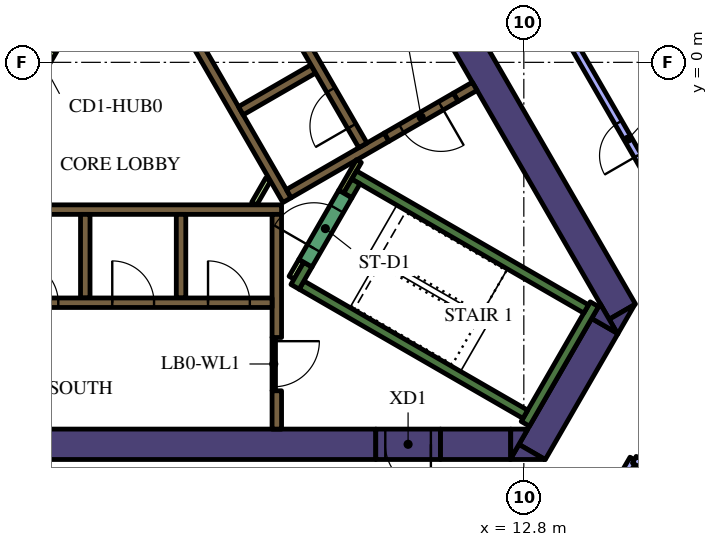
"""IFC4 building model, lengths in metres.
Left out: names, types, materials, properties, quantities, classifications, styles, units other than length and angle.
Written with IfcOpenShell. Run it as: python <this file> out.ifc"""

import sys

from ifc_helpers import new_model, si_unit, direction, frame, frame_2d, origin, place, context, subcontext, project, spatial, polyline, rectangle, outline, extrude, element, fill, save


model = new_model("IFC4")
c1 = context("Model", 3, precision=1e-05, world=origin(), true_north=direction((0.0, 1.0)))
c2 = subcontext(c1, "Body", "Model", "MODEL_VIEW")
j1 = project(units=[si_unit("LENGTHUNIT", "METRE"), si_unit("PLANEANGLEUNIT", "RADIAN")], contexts=[c1])
p1 = place(None, origin())
s1 = spatial("IfcSite", under=j1, at=p1, CompositionType="ELEMENT")
p2 = place(p1, origin())
s2 = spatial("IfcBuilding", under=s1, at=p2, CompositionType="ELEMENT")
p3 = place(p2, frame((0.0, 0.0, 162.6)))
s3 = spatial("IfcBuildingStorey", under=s2, at=p3, CompositionType="ELEMENT", Elevation=162.6)
p4 = place(p3, frame((9.129, 4.289, 0.0), z_axis=(0.0, 0.0, 1.0), x_axis=(0.499995742806, -0.866027861663, 0.0)))
e1 = element("IfcWall", 1, at=p4, inside=s3, PredefinedType="SOLIDWALL", context=c2, shape_type="SweptSolid", body=[
    extrude(rectangle(XDim=12.527, YDim=0.8, at=frame_2d((6.264, 0.0))), origin(), (0.0, 0.0, 1.0), 4.2),
])
p5 = place(p3, origin())
e2 = element("IfcWall", 2, at=p5, inside=s3, PredefinedType="SOLIDWALL", context=c2, shape_type="SweptSolid", body=[
    extrude(outline(polyline([(15.271, -7.15), (15.047, -6.762), (15.719, -6.374), (15.271, -7.15)])), origin(), (0.0, 0.0, 1.0), 4.2),
])
p6 = place(p3, frame((13.018, -10.252, 0.0), z_axis=(0.0, 0.0, 1.0), x_axis=(0.499984020225, 0.866034629516, 0.0)))
e3 = element("IfcWall", 3, at=p6, inside=s3, PredefinedType="SOLIDWALL", context=c2, shape_type="SweptSolid", body=[
    extrude(rectangle(XDim=3.824, YDim=0.8, at=frame_2d((1.912, 0.0))), origin(), (0.0, 0.0, 1.0), 4.2),
])
e4 = element("IfcWall", 4, at=p5, inside=s3, PredefinedType="SOLIDWALL", context=c2, shape_type="SweptSolid", body=[
    extrude(outline(polyline([(12.442, -10.45), (12.671, -10.053), (13.358, -10.45), (12.442, -10.45)])), origin(), (0.0, 0.0, 1.0), 4.2),
])
e5 = element("IfcWall", 5, at=p5, inside=s3, PredefinedType="SOLIDWALL", context=c2, shape_type="SweptSolid", body=[
    extrude(outline(polyline([(14.809, -6.35), (15.257, -7.126), (14.585, -6.738), (14.809, -6.35)])), origin(), (0.0, 0.0, 1.0), 4.2),
])
p7 = place(p3, frame((10.604, -10.05, 0.0), z_axis=(0.0, 0.0, 1.0), x_axis=(1.0, 0.0, 0.0)))
e6 = element("IfcWall", 6, at=p7, inside=s3, PredefinedType="SOLIDWALL", context=c2, shape_type="SweptSolid", body=[
    extrude(rectangle(XDim=1.849, YDim=0.8, at=frame_2d((0.925, 0.0))), origin(), (0.0, 0.0, 1.0), 4.2),
])
e7 = element("IfcWall", 7, at=p5, inside=s3, PredefinedType="SOLIDWALL", context=c2, shape_type="SweptSolid", body=[
    extrude(outline(polyline([(12.904, -9.65), (12.456, -10.426), (12.456, -9.65), (12.904, -9.65)])), origin(), (0.0, 0.0, 1.0), 4.2),
])
p8 = place(p3, frame((-13.378, -10.05, 0.0), z_axis=(0.0, 0.0, 1.0), x_axis=(1.0, 0.0, 0.0)))
e8 = element("IfcWall", 8, at=p8, inside=s3, PredefinedType="SOLIDWALL", context=c2, shape_type="SweptSolid", body=[
    extrude(rectangle(XDim=22.282, YDim=0.8, at=frame_2d((11.141, 0.0))), origin(), (0.0, 0.0, 1.0), 4.2),
])
p9 = place(p3, frame((12.84, -9.511, 0.0), z_axis=(0.0, 0.0, 1.0), x_axis=(0.499997733992, 0.866026712061, 0.0)))
e9 = element("IfcWall", 9, at=p9, inside=s3, PredefinedType="SOLIDWALL", context=c2, shape_type="SweptSolid", body=[
    extrude(rectangle(XDim=3.634, YDim=0.25, at=frame_2d((1.817, 0.0))), origin(), (0.0, 0.0, 1.0), 4.2),
])
p10 = place(p3, frame((12.84, -9.261, 0.0), z_axis=(0.0, 0.0, 1.0), x_axis=(-0.866013990052, 0.500019768644, 0.0)))
e10 = element("IfcWall", 10, at=p10, inside=s3, PredefinedType="SOLIDWALL", context=c2, shape_type="SweptSolid", body=[
    extrude(rectangle(XDim=6.8, YDim=0.25, at=frame_2d((3.4, 0.0))), origin(), (0.0, 0.0, 1.0), 4.2),
])
p11 = place(p3, frame((6.78, -5.906, 0.0), z_axis=(0.0, 0.0, 1.0), x_axis=(0.500223362819, 0.865896406789, 0.0)))
e11 = element("IfcWall", 11, at=p11, inside=s3, PredefinedType="SOLIDWALL", context=c2, shape_type="SweptSolid", body=[
    extrude(rectangle(XDim=0.675, YDim=0.25, at=frame_2d((0.337, 0.0))), origin(), (0.0, 0.0, 1.0), 4.2),
])
p12 = place(p3, frame((8.334, -2.964, 0.0), z_axis=(0.0, 0.0, 1.0), x_axis=(0.866016039709, -0.500016218704, 0.0)))
e12 = element("IfcWall", 12, at=p12, inside=s3, PredefinedType="SOLIDWALL", context=c2, shape_type="SweptSolid", body=[
    extrude(rectangle(XDim=7.05, YDim=0.25, at=frame_2d((3.525, 0.0))), origin(), (0.0, 0.0, 1.0), 4.2),
])
p13 = place(p3, frame((8.168, -3.503, 0.0), z_axis=(0.0, 0.0, 1.0), x_axis=(0.49972245349, 0.866185586049, 0.0)))
e13 = element("IfcWall", 13, at=p13, inside=s3, PredefinedType="SOLIDWALL", context=c2, shape_type="SweptSolid", body=[
    extrude(rectangle(XDim=0.425, YDim=0.25, at=frame_2d((0.212, 0.0))), origin(), (0.0, 0.0, 1.0), 4.2),
])
p14 = place(p3, frame((-5.545, -3.875, 0.0), z_axis=(0.0, 0.0, 1.0), x_axis=(1.0, 0.0, 0.0)))
e14 = element("IfcWall", 14, at=p14, inside=s3, PredefinedType="SOLIDWALL", context=c2, shape_type="SweptSolid", body=[
    extrude(rectangle(XDim=11.97, YDim=0.25, at=frame_2d((5.985, 0.0))), origin(), (0.0, 0.0, 1.0), 4.2),
])
p15 = place(p3, frame((6.3, -7.24, 0.0), z_axis=(0.0, 0.0, 1.0), x_axis=(0.0, 1.0, 0.0)))
e15 = element("IfcWall", 15, at=p15, inside=s3, PredefinedType="SOLIDWALL", context=c2, shape_type="SweptSolid", body=[
    extrude(rectangle(XDim=3.24, YDim=0.25, at=frame_2d((1.62, 0.0))), origin(), (0.0, 0.0, 1.0), 4.2),
])
p16 = place(p3, frame((6.3, -9.65, 0.0), z_axis=(0.0, 0.0, 1.0), x_axis=(0.0, 1.0, 0.0)))
e16 = element("IfcWall", 16, at=p16, inside=s3, PredefinedType="SOLIDWALL", context=c2, shape_type="SweptSolid", body=[
    extrude(rectangle(XDim=1.008, YDim=0.25, at=frame_2d((0.504, 0.0))), origin(), (0.0, 0.0, 1.0), 4.2),
])
for number, where, z_axis, x_axis in (
    (17, (3.78, -4.0, 0.0), (0.0, 0.0, 1.0), (0.0, -1.0, 0.0)),
    (18, (1.26, -4.0, 0.0), (0.0, 0.0, 1.0), (0.0, -1.0, 0.0)),
):
    element("IfcWall", number, at=place(p3, frame(where, z_axis=z_axis, x_axis=x_axis)), inside=s3, PredefinedType="SOLIDWALL", context=c2, shape_type="SweptSolid", body=[
        extrude(rectangle(XDim=2.2, YDim=0.25, at=frame_2d((1.1, 0.0))), origin(), (0.0, 0.0, 1.0), 4.2),
    ])
p17 = place(p3, frame((11.507, -0.631, 0.0), z_axis=(0.0, 0.0, 1.0), x_axis=(-0.866093731455, -0.499881634324, 0.0)))
e19 = element("IfcWall", 19, at=p17, inside=s3, PredefinedType="SOLIDWALL", context=c2, shape_type="SweptSolid", body=[
    extrude(rectangle(XDim=0.575, YDim=0.25, at=frame_2d((0.288, 0.0))), origin(), (0.0, 0.0, 1.0), 4.2),
])
p18 = place(p3, frame((6.568, -3.627, 0.0), z_axis=(0.0, 0.0, 1.0), x_axis=(-0.499999455981, 0.866025717874, 0.0)))
e20 = element("IfcWall", 20, at=p18, inside=s3, PredefinedType="SOLIDWALL", context=c2, shape_type="SweptSolid", body=[
    extrude(rectangle(XDim=11.978, YDim=0.25, at=frame_2d((5.989, 0.0))), origin(), (0.0, 0.0, 1.0), 4.2),
])
p19 = place(p3, frame((5.354, -1.274, 0.0), z_axis=(0.0, 0.0, 1.0), x_axis=(0.866008176907, 0.50002983664, 0.0)))
e21 = element("IfcWall", 21, at=p19, inside=s3, PredefinedType="SOLIDWALL", context=c2, shape_type="SweptSolid", body=[
    extrude(rectangle(XDim=2.2, YDim=0.25, at=frame_2d((1.1, 0.0))), origin(), (0.0, 0.0, 1.0), 4.2),
])
p20 = place(p3, frame((6.614, -3.456, 0.0), z_axis=(0.0, 0.0, 1.0), x_axis=(0.866032512851, 0.499987686533, 0.0)))
e22 = element("IfcWall", 22, at=p20, inside=s3, PredefinedType="SOLIDWALL", context=c2, shape_type="SweptSolid", body=[
    extrude(rectangle(XDim=2.975, YDim=0.25, at=frame_2d((1.487, 0.0))), origin(), (0.0, 0.0, 1.0), 4.2),
])
p21 = place(p3, frame((6.945, -5.222, 0.0), z_axis=(0.0, 0.0, 1.0), x_axis=(-0.499818422106, -0.866130212453, 0.0)))
e23 = element("IfcWall", 23, at=p21, inside=s3, PredefinedType="PARTITIONING", context=c2, shape_type="SweptSolid", body=[
    extrude(rectangle(XDim=0.514, YDim=0.15, at=frame_2d((0.257, 0.0))), origin(), (0.0, 0.0, 1.0), 3.15),
])
p22 = place(p3, frame((8.459, -2.599, 0.0), z_axis=(0.0, 0.0, 1.0), x_axis=(-0.500041054325, -0.866001699761, 0.0)))
e24 = element("IfcWall", 24, at=p22, inside=s3, PredefinedType="PARTITIONING", context=c2, shape_type="SweptSolid", body=[
    extrude(rectangle(XDim=0.929, YDim=0.15, at=frame_2d((0.464, 0.0))), origin(), (0.0, 0.0, 1.0), 4.2),
])
p23 = place(p3, frame((5.705, -3.718, 0.0), z_axis=(0.0, 0.0, 1.0), x_axis=(0.499962090823, 0.866047289552, 0.0)))
e25 = element("IfcWall", 25, at=p23, inside=s3, PredefinedType="PARTITIONING", context=c2, shape_type="SweptSolid", body=[
    extrude(rectangle(XDim=0.735, YDim=0.15, at=frame_2d((0.367, 0.0))), origin(), (0.0, 0.0, 1.0), 3.15),
])
p24 = place(p3, frame((-6.175, -6.325, 0.0), z_axis=(0.0, 0.0, 1.0), x_axis=(1.0, 0.0, 0.0)))
e26 = element("IfcWall", 26, at=p24, inside=s3, PredefinedType="SOLIDWALL", context=c2, shape_type="SweptSolid", body=[
    extrude(rectangle(XDim=12.35, YDim=0.25, at=frame_2d((6.175, 0.0))), origin(), (0.0, 0.0, 1.0), 4.2),
])
p25 = place(p24, frame((0.585, 0.0, 0.0)))
e27 = element("IfcOpeningElement", 27, at=p25, cuts=e26, PredefinedType="OPENING", context=c2, shape_type="SweptSolid", body=[
    extrude(rectangle(XDim=1.1, YDim=2.1, at=frame_2d((0.55, 1.05))), frame((0.0, 0.135, 0.0), z_axis=(0.0, -1.0, 0.0), x_axis=(1.0, 0.0, 0.0)), (0.0, 0.0, 1.0), 0.27),
])
p26 = place(p24, frame((3.105, 0.0, 0.0)))
e28 = element("IfcOpeningElement", 28, at=p26, cuts=e26, PredefinedType="OPENING", context=c2, shape_type="SweptSolid", body=[
    extrude(rectangle(XDim=1.1, YDim=2.1, at=frame_2d((0.55, 1.05))), frame((0.0, 0.135, 0.0), z_axis=(0.0, -1.0, 0.0), x_axis=(1.0, 0.0, 0.0)), (0.0, 0.0, 1.0), 0.27),
])
p27 = place(p24, frame((5.625, 0.0, 0.0)))
e29 = element("IfcOpeningElement", 29, at=p27, cuts=e26, PredefinedType="OPENING", context=c2, shape_type="SweptSolid", body=[
    extrude(rectangle(XDim=1.1, YDim=2.1, at=frame_2d((0.55, 1.05))), frame((0.0, 0.135, 0.0), z_axis=(0.0, -1.0, 0.0), x_axis=(1.0, 0.0, 0.0)), (0.0, 0.0, 1.0), 0.27),
])
p28 = place(p24, frame((8.145, 0.0, 0.0)))
e30 = element("IfcOpeningElement", 30, at=p28, cuts=e26, PredefinedType="OPENING", context=c2, shape_type="SweptSolid", body=[
    extrude(rectangle(XDim=1.1, YDim=2.1, at=frame_2d((0.55, 1.05))), frame((0.0, 0.135, 0.0), z_axis=(0.0, -1.0, 0.0), x_axis=(1.0, 0.0, 0.0)), (0.0, 0.0, 1.0), 0.27),
])
p29 = place(p24, frame((10.665, 0.0, 0.0)))
e31 = element("IfcOpeningElement", 31, at=p29, cuts=e26, PredefinedType="OPENING", context=c2, shape_type="SweptSolid", body=[
    extrude(rectangle(XDim=1.1, YDim=2.1, at=frame_2d((0.55, 1.05))), frame((0.0, 0.135, 0.0), z_axis=(0.0, -1.0, 0.0), x_axis=(1.0, 0.0, 0.0)), (0.0, 0.0, 1.0), 0.27),
])
p30 = place(p3, frame((8.565, -2.185, 0.0), z_axis=(0.0, 0.0, 1.0), x_axis=(-0.499997954832, 0.866026584559, 0.0)))
e32 = element("IfcWall", 32, at=p30, inside=s3, PredefinedType="SOLIDWALL", context=c2, shape_type="SweptSolid", body=[
    extrude(rectangle(XDim=12.35, YDim=0.25, at=frame_2d((6.175, 0.0))), origin(), (0.0, 0.0, 1.0), 4.2),
])
p31 = place(p30, frame((0.585, 0.0, 0.0)))
e33 = element("IfcOpeningElement", 33, at=p31, cuts=e32, PredefinedType="OPENING", context=c2, shape_type="SweptSolid", body=[
    extrude(rectangle(XDim=1.1, YDim=2.1, at=frame_2d((0.55, 1.05))), frame((0.0, 0.135, 0.0), z_axis=(0.0, -1.0, 0.0), x_axis=(1.0, 0.0, 0.0)), (0.0, 0.0, 1.0), 0.27),
])
p32 = place(p3, frame((7.053, -5.284, 0.0), z_axis=(0.0, 0.0, 1.0), x_axis=(0.500078061341, 0.865980330357, 0.0)))
e34 = element("IfcWall", 34, at=p32, inside=s3, PredefinedType="SOLIDWALL", context=c2, shape_type="SweptSolid", body=[
    extrude(rectangle(XDim=2.1, YDim=0.4, at=frame_2d((1.05, 0.0))), origin(), (0.0, 0.0, 1.0), 4.2),
])
p33 = place(p32, frame((0.45, 0.0, 0.0)))
e35 = element("IfcOpeningElement", 35, at=p33, cuts=e34, PredefinedType="OPENING", context=c2, shape_type="SweptSolid", body=[
    extrude(rectangle(XDim=1.2, YDim=2.1, at=frame_2d((0.6, 1.05))), frame((0.0, 0.21, 0.0), z_axis=(0.0, -1.0, 0.0), x_axis=(1.0, 0.0, 0.0)), (0.0, 0.0, 1.0), 0.42),
])
p34 = place(p3, frame((-0.33, -1.022, 0.0), z_axis=(0.0, 0.0, 1.0), x_axis=(0.500027713859, 0.866009402589, 0.0)))
e36 = element("IfcWall", 36, at=p34, inside=s3, PredefinedType="PARTITIONING", context=c2, shape_type="SweptSolid", body=[
    extrude(rectangle(XDim=2.1, YDim=0.15, at=frame_2d((1.05, 0.0))), origin(), (0.0, 0.0, 1.0), 3.15),
])
p35 = place(p34, frame((0.6, 0.0, 0.0)))
e37 = element("IfcOpeningElement", 37, at=p35, cuts=e36, PredefinedType="OPENING", context=c2, shape_type="SweptSolid", body=[
    extrude(rectangle(XDim=0.9, YDim=2.1, at=frame_2d((0.45, 1.05))), frame((0.0, 0.085, 0.0), z_axis=(0.0, -1.0, 0.0), x_axis=(1.0, 0.0, 0.0)), (0.0, 0.0, 1.0), 0.17),
])
p36 = place(p3, frame((6.22, -7.237, 0.0), z_axis=(0.0, 0.0, 1.0), x_axis=(0.0, -1.0, 0.0)))
e38 = element("IfcWall", 38, at=p36, inside=s3, PredefinedType="PARTITIONING", context=c2, shape_type="SweptSolid", body=[
    extrude(rectangle(XDim=1.4, YDim=0.09, at=frame_2d((0.7, 0.0))), origin(), (0.0, 0.0, 1.0), 3.15),
])
p37 = place(p36, frame((0.1, 0.0, 0.0)))
e39 = element("IfcOpeningElement", 39, at=p37, cuts=e38, PredefinedType="OPENING", context=c2, shape_type="SweptSolid", body=[
    extrude(rectangle(XDim=1.2, YDim=2.1, at=frame_2d((0.6, 1.05))), frame((0.0, 0.055, 0.0), z_axis=(0.0, -1.0, 0.0), x_axis=(1.0, 0.0, 0.0)), (0.0, 0.0, 1.0), 0.11),
])
p38 = place(p3, frame((11.009, -0.919, 0.0), z_axis=(0.0, 0.0, 1.0), x_axis=(-0.866059744384, -0.49994051562, 0.0)))
e40 = element("IfcWall", 40, at=p38, inside=s3, PredefinedType="SOLIDWALL", context=c2, shape_type="SweptSolid", body=[
    extrude(rectangle(XDim=2.1, YDim=0.25, at=frame_2d((1.05, 0.0))), origin(), (0.0, 0.0, 1.0), 4.2),
])
p39 = place(p38, frame((0.45, 0.0, 0.0)))
e41 = element("IfcOpeningElement", 41, at=p39, cuts=e40, PredefinedType="OPENING", context=c2, shape_type="SweptSolid", body=[
    extrude(rectangle(XDim=1.2, YDim=2.1, at=frame_2d((0.6, 1.05))), frame((0.0, 0.135, 0.0), z_axis=(0.0, -1.0, 0.0), x_axis=(1.0, 0.0, 0.0)), (0.0, 0.0, 1.0), 0.27),
])
p40 = place(p3, frame((10.604, -10.05, 0.0), z_axis=(0.0, 0.0, 1.0), x_axis=(-1.0, 0.0, 0.0)))
e42 = element("IfcWall", 42, at=p40, inside=s3, PredefinedType="SOLIDWALL", context=c2, shape_type="SweptSolid", body=[
    extrude(rectangle(XDim=1.7, YDim=0.8, at=frame_2d((0.85, 0.0))), origin(), (0.0, 0.0, 1.0), 4.2),
])
p41 = place(p40, frame((0.25, 0.0, 0.0)))
e43 = element("IfcOpeningElement", 43, at=p41, cuts=e42, PredefinedType="OPENING", context=c2, shape_type="SweptSolid", body=[
    extrude(rectangle(XDim=1.2, YDim=2.1, at=frame_2d((0.6, 1.05))), frame((0.0, 0.41, 0.0), z_axis=(0.0, -1.0, 0.0), x_axis=(1.0, 0.0, 0.0)), (0.0, 0.0, 1.0), 0.82),
])
p42 = place(p3, frame((14.589, -12.331, 0.0), z_axis=(0.0, 0.0, 1.0), x_axis=(0.500044870432, 0.865999496279, 0.0)))
e44 = element("IfcWall", 44, at=p42, inside=s3, PredefinedType="PARTITIONING", context=c2, shape_type="SweptSolid", body=[
    extrude(rectangle(XDim=2.185, YDim=0.2, at=frame_2d((1.092, 0.0))), origin(), (0.0, 0.0, 1.0), 3.15),
])
p43 = place(p3, frame((15.707, -10.454, 0.0), z_axis=(0.0, 0.0, 1.0), x_axis=(0.866017375886, -0.50001390447, 0.0)))
e45 = element("IfcWall", 45, at=p43, inside=s3, PredefinedType="PARTITIONING", context=c2, shape_type="SweptSolid", body=[
    extrude(rectangle(XDim=5.97, YDim=0.2, at=frame_2d((2.985, 0.0))), origin(), (0.0, 0.0, 1.0), 3.15),
])
p44 = place(p3, frame((18.042, -6.35, 0.0), z_axis=(0.0, 0.0, 1.0), x_axis=(-0.499986873641, 0.866032982159, 0.0)))
e46 = element("IfcWall", 46, at=p44, inside=s3, PredefinedType="PARTITIONING", context=c2, shape_type="SweptSolid", body=[
    extrude(rectangle(XDim=9.99, YDim=0.2, at=frame_2d((4.995, 0.0))), origin(), (0.0, 0.0, 1.0), 3.15),
])
p45 = place(p44, frame((4.5, 0.0, 0.0)))
e47 = element("IfcOpeningElement", 47, at=p45, cuts=e46, PredefinedType="OPENING", context=c2, shape_type="SweptSolid", body=[
    extrude(rectangle(XDim=1.0, YDim=2.1, at=frame_2d((0.5, 1.05))), frame((0.0, 0.11, 0.0), z_axis=(0.0, -1.0, 0.0), x_axis=(1.0, 0.0, 0.0)), (0.0, 0.0, 1.0), 0.22),
])
p46 = place(p27, origin())
e48 = element("IfcDoor", 48, at=p46, inside=s3, OperationType="DOUBLE_DOOR_SLIDING", PredefinedType="DOOR", context=c2, shape_type="SweptSolid", body=[
    extrude(rectangle(XDim=1.1, YDim=2.1, at=frame_2d((0.55, 1.05))), frame((0.0, 0.025, 0.0), z_axis=(0.0, -1.0, 0.0), x_axis=(1.0, 0.0, 0.0)), (0.0, 0.0, 1.0), 0.05),
])
fill(e29, e48)
p47 = place(p28, origin())
e49 = element("IfcDoor", 49, at=p47, inside=s3, OperationType="DOUBLE_DOOR_SLIDING", PredefinedType="DOOR", context=c2, shape_type="SweptSolid", body=[
    extrude(rectangle(XDim=1.1, YDim=2.1, at=frame_2d((0.55, 1.05))), frame((0.0, 0.025, 0.0), z_axis=(0.0, -1.0, 0.0), x_axis=(1.0, 0.0, 0.0)), (0.0, 0.0, 1.0), 0.05),
])
fill(e30, e49)
p48 = place(p29, origin())
e50 = element("IfcDoor", 50, at=p48, inside=s3, OperationType="DOUBLE_DOOR_SLIDING", PredefinedType="DOOR", context=c2, shape_type="SweptSolid", body=[
    extrude(rectangle(XDim=1.1, YDim=2.1, at=frame_2d((0.55, 1.05))), frame((0.0, 0.025, 0.0), z_axis=(0.0, -1.0, 0.0), x_axis=(1.0, 0.0, 0.0)), (0.0, 0.0, 1.0), 0.05),
])
fill(e31, e50)
p49 = place(p31, origin())
e51 = element("IfcDoor", 51, at=p49, inside=s3, OperationType="DOUBLE_DOOR_SLIDING", PredefinedType="DOOR", context=c2, shape_type="SweptSolid", body=[
    extrude(rectangle(XDim=1.1, YDim=2.1, at=frame_2d((0.55, 1.05))), frame((0.0, 0.025, 0.0), z_axis=(0.0, -1.0, 0.0), x_axis=(1.0, 0.0, 0.0)), (0.0, 0.0, 1.0), 0.05),
])
fill(e33, e51)
p50 = place(p33, origin())
e52 = element("IfcDoor", 52, at=p50, inside=s3, OperationType="SINGLE_SWING_LEFT", PredefinedType="DOOR", context=c2, shape_type="SweptSolid", body=[
    extrude(rectangle(XDim=1.2, YDim=2.1, at=frame_2d((0.6, 1.05))), frame((0.0, 0.025, 0.0), z_axis=(0.0, -1.0, 0.0), x_axis=(1.0, 0.0, 0.0)), (0.0, 0.0, 1.0), 0.05),
])
fill(e35, e52)
p51 = place(p35, origin())
e53 = element("IfcDoor", 53, at=p51, inside=s3, OperationType="SINGLE_SWING_LEFT", PredefinedType="DOOR", context=c2, shape_type="SweptSolid", body=[
    extrude(rectangle(XDim=0.9, YDim=2.1, at=frame_2d((0.45, 1.05))), frame((0.0, 0.025, 0.0), z_axis=(0.0, -1.0, 0.0), x_axis=(1.0, 0.0, 0.0)), (0.0, 0.0, 1.0), 0.05),
])
fill(e37, e53)
p52 = place(p37, origin())
e54 = element("IfcDoor", 54, at=p52, inside=s3, OperationType="SINGLE_SWING_LEFT", PredefinedType="DOOR", context=c2, shape_type="SweptSolid", body=[
    extrude(rectangle(XDim=1.2, YDim=2.1, at=frame_2d((0.6, 1.05))), frame((0.0, 0.025, 0.0), z_axis=(0.0, -1.0, 0.0), x_axis=(1.0, 0.0, 0.0)), (0.0, 0.0, 1.0), 0.05),
])
fill(e39, e54)
p53 = place(p39, origin())
e55 = element("IfcDoor", 55, at=p53, inside=s3, OperationType="SINGLE_SWING_LEFT", PredefinedType="DOOR", context=c2, shape_type="SweptSolid", body=[
    extrude(rectangle(XDim=1.2, YDim=2.1, at=frame_2d((0.6, 1.05))), frame((0.0, 0.025, 0.0), z_axis=(0.0, -1.0, 0.0), x_axis=(1.0, 0.0, 0.0)), (0.0, 0.0, 1.0), 0.05),
])
fill(e41, e55)
p54 = place(p41, origin())
e56 = element("IfcDoor", 56, at=p54, inside=s3, OperationType="SINGLE_SWING_LEFT", PredefinedType="DOOR", context=c2, shape_type="SweptSolid", body=[
    extrude(rectangle(XDim=1.2, YDim=2.1, at=frame_2d((0.6, 1.05))), frame((0.0, 0.025, 0.0), z_axis=(0.0, -1.0, 0.0), x_axis=(1.0, 0.0, 0.0)), (0.0, 0.0, 1.0), 0.05),
])
fill(e43, e56)
p55 = place(p45, origin())
e57 = element("IfcDoor", 57, at=p55, inside=s3, OperationType="SINGLE_SWING_RIGHT", PredefinedType="DOOR", context=c2, shape_type="SweptSolid", body=[
    extrude(rectangle(XDim=1.0, YDim=2.1, at=frame_2d((0.5, 1.05))), frame((0.0, 0.025, 0.0), z_axis=(0.0, -1.0, 0.0), x_axis=(1.0, 0.0, 0.0)), (0.0, 0.0, 1.0), 0.05),
])
fill(e47, e57)
save(model, sys.argv[1])
